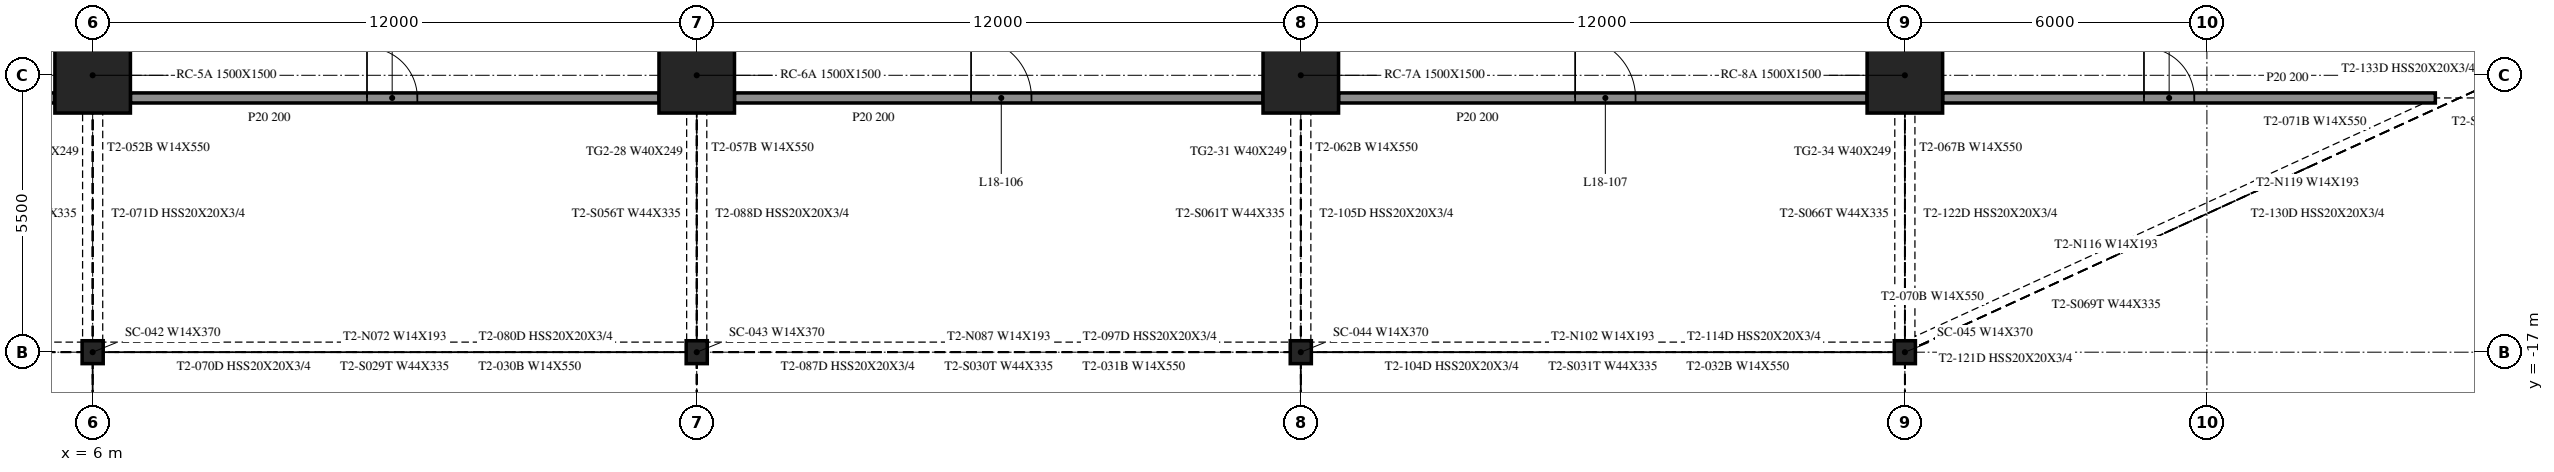
"""IFC4 building model, lengths in metres.
Left out: names, types, materials, properties, quantities, classifications, styles, units other than length and angle.
Written with IfcOpenShell. Run it as: python <this file> out.ifc"""

import sys

from ifc_helpers import new_model, si_unit, direction, frame, frame_2d, origin, origin_2d, place, context, subcontext, project, spatial, rectangle, i_section, extrude, element, fill, save


model = new_model("IFC4")
c1 = context("Model", 3, precision=1e-05, world=origin(), true_north=direction((0.0, 1.0)))
c2 = subcontext(c1, "Body", "Model", "MODEL_VIEW")
j1 = project(units=[si_unit("LENGTHUNIT", "METRE"), si_unit("PLANEANGLEUNIT", "RADIAN")], contexts=[c1])
p1 = place(None, origin())
s1 = spatial("IfcSite", under=j1, at=p1, CompositionType="ELEMENT")
p2 = place(p1, origin())
s2 = spatial("IfcBuilding", under=s1, at=p2, CompositionType="ELEMENT")
p3 = place(p2, frame((0.0, 0.0, 80.4)))
s3 = spatial("IfcBuildingStorey", under=s2, at=p3, CompositionType="ELEMENT", Elevation=80.4)
for number, where, z_axis, x_axis in (
    (1, (6.0, -11.5, -0.55), (0.0, 0.0, 1.0), (1.0, 0.0, 0.0)),
    (2, (18.0, -11.5, -0.55), (0.0, 0.0, 1.0), (1.0, 0.0, 0.0)),
    (3, (30.0, -11.5, -0.55), (0.0, 0.0, 1.0), (1.0, 0.0, 0.0)),
    (4, (42.0, -11.5, -0.55), (0.0, 0.0, 1.0), (1.0, 0.0, 0.0)),
):
    element("IfcColumn", number, at=place(p3, frame(where, z_axis=z_axis, x_axis=x_axis)), inside=s3, PredefinedType="COLUMN", context=c2, shape_type="SweptSolid", body=[
        extrude(rectangle(XDim=1.5, YDim=1.5, at=origin_2d()), origin(), (0.0, 0.0, 1.0), 4.61),
    ])
for number, where, z_axis, x_axis in (
    (5, (6.0, -17.0, -0.55), (0.0, 0.0, 1.0), (1.0, 0.0, 0.0)),
    (6, (18.0, -17.0, -0.55), (0.0, 0.0, 1.0), (1.0, 0.0, 0.0)),
    (7, (30.0, -17.0, -0.55), (0.0, 0.0, 1.0), (1.0, 0.0, 0.0)),
    (8, (42.0, -17.0, -0.55), (0.0, 0.0, 1.0), (1.0, 0.0, 0.0)),
):
    element("IfcColumn", number, at=place(p3, frame(where, z_axis=z_axis, x_axis=x_axis)), inside=s3, PredefinedType="COLUMN", context=c2, shape_type="SweptSolid", body=[
        extrude(i_section(OverallWidth=0.419, OverallDepth=0.455, WebThickness=0.042, FlangeThickness=0.068, at=origin_2d()), origin(), (0.0, 0.0, 1.0), 4.61),
    ])
p4 = place(p3, frame((-5.25, -11.95, 0.0), z_axis=(0.0, 0.0, 1.0), x_axis=(1.0, 0.0, 0.0)))
e9 = element("IfcWall", 9, at=p4, inside=s3, PredefinedType="PARTITIONING", context=c2, shape_type="SweptSolid", body=[
    extrude(rectangle(XDim=10.5, YDim=0.2, at=frame_2d((5.25, 0.0))), origin(), (0.0, 0.0, 1.0), 4.06),
])
p5 = place(p4, frame((4.7, 0.0, 0.0)))
e10 = element("IfcOpeningElement", 10, at=p5, cuts=e9, PredefinedType="OPENING", context=c2, shape_type="SweptSolid", body=[
    extrude(rectangle(XDim=1.0, YDim=2.1, at=frame_2d((0.5, 1.05))), frame((0.0, 0.11, 0.0), z_axis=(0.0, -1.0, 0.0), x_axis=(1.0, 0.0, 0.0)), (0.0, 0.0, 1.0), 0.22),
])
p6 = place(p3, frame((6.75, -11.95, 0.0), z_axis=(0.0, 0.0, 1.0), x_axis=(1.0, 0.0, 0.0)))
e11 = element("IfcWall", 11, at=p6, inside=s3, PredefinedType="PARTITIONING", context=c2, shape_type="SweptSolid", body=[
    extrude(rectangle(XDim=10.5, YDim=0.2, at=frame_2d((5.25, 0.0))), origin(), (0.0, 0.0, 1.0), 4.06),
])
p7 = place(p6, frame((4.7, 0.0, 0.0)))
e12 = element("IfcOpeningElement", 12, at=p7, cuts=e11, PredefinedType="OPENING", context=c2, shape_type="SweptSolid", body=[
    extrude(rectangle(XDim=1.0, YDim=2.1, at=frame_2d((0.5, 1.05))), frame((0.0, 0.11, 0.0), z_axis=(0.0, -1.0, 0.0), x_axis=(1.0, 0.0, 0.0)), (0.0, 0.0, 1.0), 0.22),
])
p8 = place(p3, frame((18.75, -11.95, 0.0), z_axis=(0.0, 0.0, 1.0), x_axis=(1.0, 0.0, 0.0)))
e13 = element("IfcWall", 13, at=p8, inside=s3, PredefinedType="PARTITIONING", context=c2, shape_type="SweptSolid", body=[
    extrude(rectangle(XDim=10.5, YDim=0.2, at=frame_2d((5.25, 0.0))), origin(), (0.0, 0.0, 1.0), 4.06),
])
p9 = place(p8, frame((4.7, 0.0, 0.0)))
e14 = element("IfcOpeningElement", 14, at=p9, cuts=e13, PredefinedType="OPENING", context=c2, shape_type="SweptSolid", body=[
    extrude(rectangle(XDim=1.2, YDim=2.1, at=frame_2d((0.6, 1.05))), frame((0.0, 0.11, 0.0), z_axis=(0.0, -1.0, 0.0), x_axis=(1.0, 0.0, 0.0)), (0.0, 0.0, 1.0), 0.22),
])
p10 = place(p3, frame((30.75, -11.95, 0.0), z_axis=(0.0, 0.0, 1.0), x_axis=(1.0, 0.0, 0.0)))
e15 = element("IfcWall", 15, at=p10, inside=s3, PredefinedType="PARTITIONING", context=c2, shape_type="SweptSolid", body=[
    extrude(rectangle(XDim=10.5, YDim=0.2, at=frame_2d((5.25, 0.0))), origin(), (0.0, 0.0, 1.0), 4.06),
])
p11 = place(p10, frame((4.7, 0.0, 0.0)))
e16 = element("IfcOpeningElement", 16, at=p11, cuts=e15, PredefinedType="OPENING", context=c2, shape_type="SweptSolid", body=[
    extrude(rectangle(XDim=1.2, YDim=2.1, at=frame_2d((0.6, 1.05))), frame((0.0, 0.11, 0.0), z_axis=(0.0, -1.0, 0.0), x_axis=(1.0, 0.0, 0.0)), (0.0, 0.0, 1.0), 0.22),
])
p12 = place(p3, frame((42.75, -11.95, 0.0), z_axis=(0.0, 0.0, 1.0), x_axis=(1.0, 0.0, 0.0)))
e17 = element("IfcWall", 17, at=p12, inside=s3, PredefinedType="PARTITIONING", context=c2, shape_type="SweptSolid", body=[
    extrude(rectangle(XDim=9.788, YDim=0.2, at=frame_2d((4.894, 0.0))), origin(), (0.0, 0.0, 1.0), 4.06),
])
p13 = place(p12, frame((4.0, 0.0, 0.0)))
e18 = element("IfcOpeningElement", 18, at=p13, cuts=e17, PredefinedType="OPENING", context=c2, shape_type="SweptSolid", body=[
    extrude(rectangle(XDim=1.0, YDim=2.1, at=frame_2d((0.5, 1.05))), frame((0.0, 0.11, 0.0), z_axis=(0.0, -1.0, 0.0), x_axis=(1.0, 0.0, 0.0)), (0.0, 0.0, 1.0), 0.22),
])
p14 = place(p7, origin())
e19 = element("IfcDoor", 19, at=p14, inside=s3, OperationType="SINGLE_SWING_RIGHT", PredefinedType="DOOR", context=c2, shape_type="SweptSolid", body=[
    extrude(rectangle(XDim=1.0, YDim=2.1, at=frame_2d((0.5, 1.05))), frame((0.0, 0.025, 0.0), z_axis=(0.0, -1.0, 0.0), x_axis=(1.0, 0.0, 0.0)), (0.0, 0.0, 1.0), 0.05),
])
fill(e12, e19)
p15 = place(p9, origin())
e20 = element("IfcDoor", 20, at=p15, inside=s3, OperationType="SINGLE_SWING_LEFT", PredefinedType="DOOR", context=c2, shape_type="SweptSolid", body=[
    extrude(rectangle(XDim=1.2, YDim=2.1, at=frame_2d((0.6, 1.05))), frame((0.0, 0.025, 0.0), z_axis=(0.0, -1.0, 0.0), x_axis=(1.0, 0.0, 0.0)), (0.0, 0.0, 1.0), 0.05),
])
fill(e14, e20)
p16 = place(p11, origin())
e21 = element("IfcDoor", 21, at=p16, inside=s3, OperationType="SINGLE_SWING_LEFT", PredefinedType="DOOR", context=c2, shape_type="SweptSolid", body=[
    extrude(rectangle(XDim=1.2, YDim=2.1, at=frame_2d((0.6, 1.05))), frame((0.0, 0.025, 0.0), z_axis=(0.0, -1.0, 0.0), x_axis=(1.0, 0.0, 0.0)), (0.0, 0.0, 1.0), 0.05),
])
fill(e16, e21)
p17 = place(p13, origin())
e22 = element("IfcDoor", 22, at=p17, inside=s3, OperationType="SINGLE_SWING_RIGHT", PredefinedType="DOOR", context=c2, shape_type="SweptSolid", body=[
    extrude(rectangle(XDim=1.0, YDim=2.1, at=frame_2d((0.5, 1.05))), frame((0.0, 0.025, 0.0), z_axis=(0.0, -1.0, 0.0), x_axis=(1.0, 0.0, 0.0)), (0.0, 0.0, 1.0), 0.05),
])
fill(e18, e22)
save(model, sys.argv[1])
